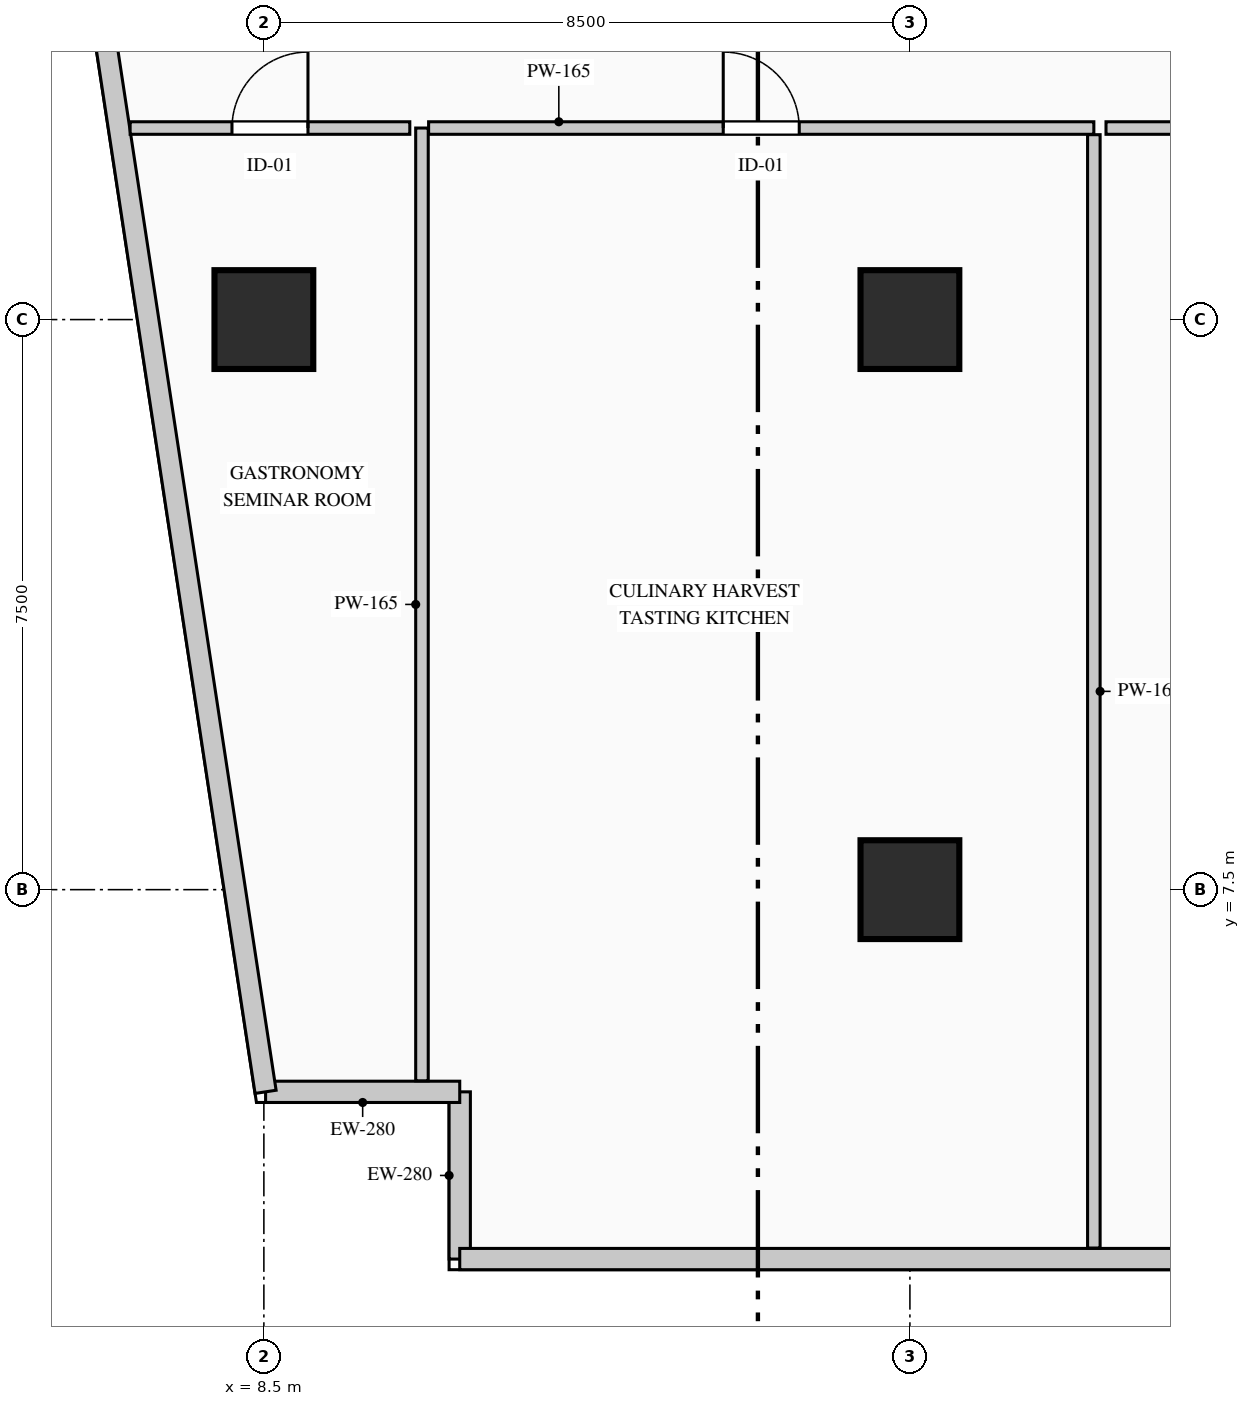
"""IFC4 building model, lengths in metres.
Left out: names, types, materials, properties, quantities, classifications, styles, units other than length and angle.
Written with IfcOpenShell. Run it as: python <this file> out.ifc"""

import sys

from ifc_helpers import new_model, si_unit, direction, frame, frame_2d, origin, origin_2d, place, context, subcontext, project, spatial, rectangle, extrude, element, fill, save


model = new_model("IFC4")
c1 = context("Model", 3, precision=1e-05, world=origin(), true_north=direction((0.0, 1.0)))
c2 = subcontext(c1, "Body", "Model", "MODEL_VIEW")
j1 = project(units=[si_unit("LENGTHUNIT", "METRE"), si_unit("PLANEANGLEUNIT", "RADIAN")], contexts=[c1])
p1 = place(None, origin())
s1 = spatial("IfcSite", under=j1, at=p1, CompositionType="ELEMENT")
p2 = place(p1, origin())
s2 = spatial("IfcBuilding", under=s1, at=p2, CompositionType="ELEMENT")
p3 = place(p2, frame((0.0, 0.0, 79.8)))
s3 = spatial("IfcBuildingStorey", under=s2, at=p3, CompositionType="ELEMENT", Elevation=79.8)
for number, where, z_axis, x_axis in (
    (1, (8.5, 15.0, 0.0), (0.0, 0.0, 1.0), (1.0, 0.0, 0.0)),
    (2, (17.0, 7.5, 0.0), (0.0, 0.0, 1.0), (1.0, 0.0, 0.0)),
    (3, (17.0, 15.0, 0.0), (0.0, 0.0, 1.0), (1.0, 0.0, 0.0)),
):
    element("IfcColumn", number, at=place(p3, frame(where, z_axis=z_axis, x_axis=x_axis)), inside=s3, PredefinedType="COLUMN", context=c2, shape_type="SweptSolid", body=[
        extrude(rectangle(XDim=1.3, YDim=1.3, at=origin_2d()), origin(), (0.0, 0.0, 1.0), 4.4),
    ])
p4 = place(p3, frame((11.077, 2.64, 0.0), z_axis=(0.0, 0.0, 1.0), x_axis=(0.0, 1.0, 0.0)))
e4 = element("IfcWall", 4, at=p4, inside=s3, PredefinedType="STANDARD", context=c2, shape_type="SweptSolid", body=[
    extrude(rectangle(XDim=2.2, YDim=0.28, at=frame_2d((1.1, 0.0))), origin(), (0.0, 0.0, 1.0), 4.115),
])
p5 = place(p3, frame((11.077, 4.84, 0.0), z_axis=(0.0, 0.0, 1.0), x_axis=(-1.0, 0.0, 0.0)))
e5 = element("IfcWall", 5, at=p5, inside=s3, PredefinedType="STANDARD", context=c2, shape_type="SweptSolid", body=[
    extrude(rectangle(XDim=2.554, YDim=0.28, at=frame_2d((1.277, 0.0))), origin(), (0.0, 0.0, 1.0), 4.115),
])
p6 = place(p3, frame((8.523, 4.84, 0.0), z_axis=(0.0, 0.0, 1.0), x_axis=(-0.150394554312, 0.988626055712, 0.0)))
e6 = element("IfcWall", 6, at=p6, inside=s3, PredefinedType="STANDARD", context=c2, shape_type="SweptSolid", body=[
    extrude(rectangle(XDim=36.738, YDim=0.28, at=frame_2d((18.369, 0.0))), origin(), (0.0, 0.0, 1.0), 4.115),
])
p7 = place(p6, frame((22.612, 0.0, 0.9)))
e7 = element("IfcOpeningElement", 7, at=p7, cuts=e6, PredefinedType="OPENING", context=c2, shape_type="SweptSolid", body=[
    extrude(rectangle(XDim=1.8, YDim=2.1, at=frame_2d((0.9, 1.05))), frame((0.0, 0.15, 0.0), z_axis=(0.0, -1.0, 0.0), x_axis=(1.0, 0.0, 0.0)), (0.0, 0.0, 1.0), 0.3),
])
p8 = place(p3, frame((26.273, 2.64, 0.0), z_axis=(0.0, 0.0, 1.0), x_axis=(-1.0, 0.0, 0.0)))
e8 = element("IfcWall", 8, at=p8, inside=s3, PredefinedType="STANDARD", context=c2, shape_type="SweptSolid", body=[
    extrude(rectangle(XDim=15.197, YDim=0.28, at=frame_2d((7.598, 0.0))), origin(), (0.0, 0.0, 1.0), 4.115),
])
p9 = place(p8, frame((3.355, 0.0, 0.9)))
e9 = element("IfcOpeningElement", 9, at=p9, cuts=e8, PredefinedType="OPENING", context=c2, shape_type="SweptSolid", body=[
    extrude(rectangle(XDim=1.8, YDim=2.1, at=frame_2d((0.9, 1.05))), frame((0.0, 0.15, 0.0), z_axis=(0.0, -1.0, 0.0), x_axis=(1.0, 0.0, 0.0)), (0.0, 0.0, 1.0), 0.3),
])
p10 = place(p3, frame((10.58, 4.985, 0.0), z_axis=(0.0, 0.0, 1.0), x_axis=(0.0, 1.0, 0.0)))
e10 = element("IfcWall", 10, at=p10, inside=s3, PredefinedType="PARTITIONING", context=c2, shape_type="SweptSolid", body=[
    extrude(rectangle(XDim=12.535, YDim=0.165, at=frame_2d((6.268, 0.0))), origin(), (0.0, 0.0, 1.0), 4.115),
])
p11 = place(p3, frame((10.667, 17.52, 0.0), z_axis=(0.0, 0.0, 1.0), x_axis=(1.0, 0.0, 0.0)))
e11 = element("IfcWall", 11, at=p11, inside=s3, PredefinedType="PARTITIONING", context=c2, shape_type="SweptSolid", body=[
    extrude(rectangle(XDim=8.752, YDim=0.165, at=frame_2d((4.376, 0.0))), origin(), (0.0, 0.0, 1.0), 4.115),
])
p12 = place(p11, frame((3.876, 0.0, 0.0)))
e12 = element("IfcOpeningElement", 12, at=p12, cuts=e11, PredefinedType="OPENING", context=c2, shape_type="SweptSolid", body=[
    extrude(rectangle(XDim=1.0, YDim=2.15, at=frame_2d((0.5, 1.075))), frame((0.0, 0.093, 0.0), z_axis=(0.0, -1.0, 0.0), x_axis=(1.0, 0.0, 0.0)), (0.0, 0.0, 1.0), 0.185),
])
p13 = place(p3, frame((19.42, 17.433, 0.0), z_axis=(0.0, 0.0, 1.0), x_axis=(0.0, -1.0, 0.0)))
e13 = element("IfcWall", 13, at=p13, inside=s3, PredefinedType="PARTITIONING", context=c2, shape_type="SweptSolid", body=[
    extrude(rectangle(XDim=14.648, YDim=0.165, at=frame_2d((7.324, 0.0))), origin(), (0.0, 0.0, 1.0), 3.8),
])
p14 = place(p3, frame((19.58, 17.52, 0.0), z_axis=(0.0, 0.0, 1.0), x_axis=(1.0, 0.0, 0.0)))
e14 = element("IfcWall", 14, at=p14, inside=s3, PredefinedType="PARTITIONING", context=c2, shape_type="SweptSolid", body=[
    extrude(rectangle(XDim=8.84, YDim=0.165, at=frame_2d((4.42, 0.0))), origin(), (0.0, 0.0, 1.0), 3.8),
])
p15 = place(p14, frame((3.92, 0.0, 0.0)))
e15 = element("IfcOpeningElement", 15, at=p15, cuts=e14, PredefinedType="OPENING", context=c2, shape_type="SweptSolid", body=[
    extrude(rectangle(XDim=1.0, YDim=2.15, at=frame_2d((0.5, 1.075))), frame((0.0, 0.093, 0.0), z_axis=(0.0, -1.0, 0.0), x_axis=(1.0, 0.0, 0.0)), (0.0, 0.0, 1.0), 0.185),
])
p16 = place(p3, frame((6.74, 17.52, 0.0), z_axis=(0.0, 0.0, 1.0), x_axis=(1.0, 0.0, 0.0)))
e16 = element("IfcWall", 16, at=p16, inside=s3, PredefinedType="PARTITIONING", context=c2, shape_type="SweptSolid", body=[
    extrude(rectangle(XDim=3.679, YDim=0.165, at=frame_2d((1.84, 0.0))), origin(), (0.0, 0.0, 1.0), 4.115),
])
p17 = place(p16, frame((1.34, 0.0, 0.0)))
e17 = element("IfcOpeningElement", 17, at=p17, cuts=e16, PredefinedType="OPENING", context=c2, shape_type="SweptSolid", body=[
    extrude(rectangle(XDim=1.0, YDim=2.15, at=frame_2d((0.5, 1.075))), frame((0.0, 0.093, 0.0), z_axis=(0.0, -1.0, 0.0), x_axis=(1.0, 0.0, 0.0)), (0.0, 0.0, 1.0), 0.185),
])
p18 = place(p12, origin())
e18 = element("IfcDoor", 18, at=p18, inside=s3, OperationType="SINGLE_SWING_LEFT", PredefinedType="DOOR", context=c2, shape_type="SweptSolid", body=[
    extrude(rectangle(XDim=1.0, YDim=2.15, at=frame_2d((0.5, 1.075))), frame((0.0, 0.025, 0.0), z_axis=(0.0, -1.0, 0.0), x_axis=(1.0, 0.0, 0.0)), (0.0, 0.0, 1.0), 0.05),
])
fill(e12, e18)
p19 = place(p17, origin())
e19 = element("IfcDoor", 19, at=p19, inside=s3, OperationType="SINGLE_SWING_RIGHT", PredefinedType="DOOR", context=c2, shape_type="SweptSolid", body=[
    extrude(rectangle(XDim=1.0, YDim=2.15, at=frame_2d((0.5, 1.075))), frame((0.0, 0.025, 0.0), z_axis=(0.0, -1.0, 0.0), x_axis=(1.0, 0.0, 0.0)), (0.0, 0.0, 1.0), 0.05),
])
fill(e17, e19)
save(model, sys.argv[1])
